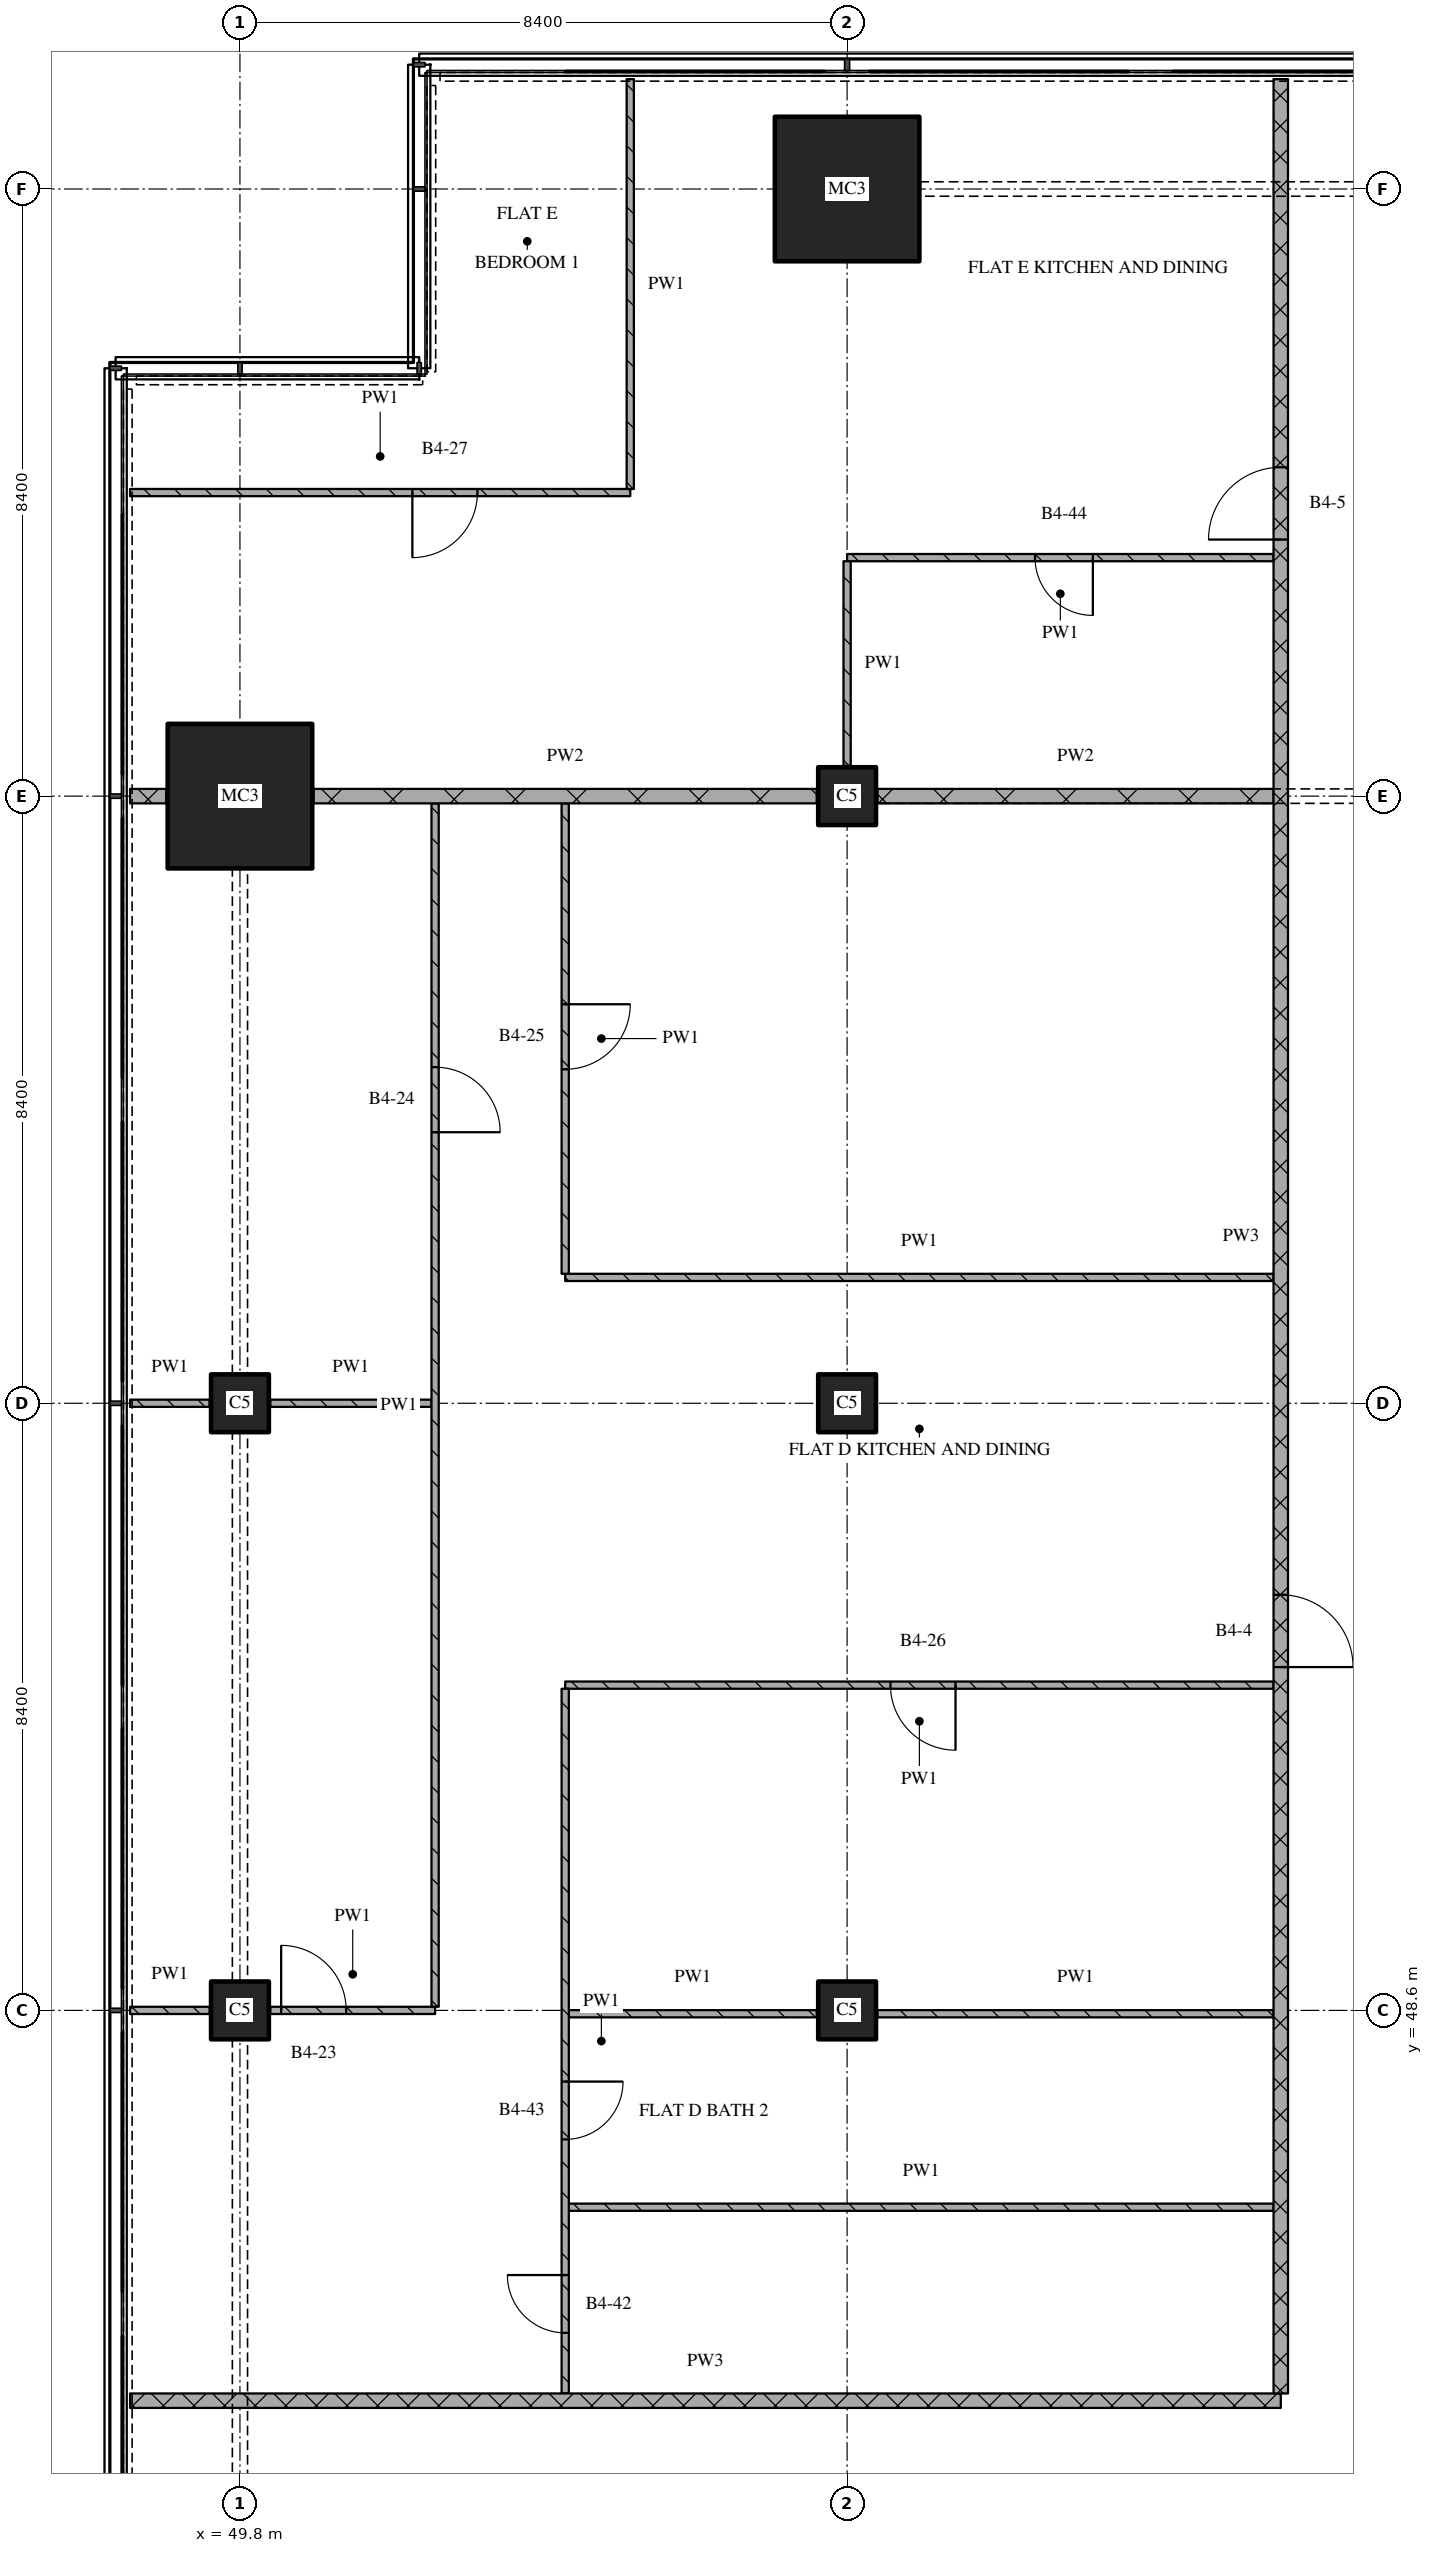
"""IFC4 building model, lengths in metres.
Left out: names, types, materials, properties, quantities, classifications, styles, units other than length and angle.
Written with IfcOpenShell. Run it as: python <this file> out.ifc"""

import sys

from ifc_helpers import new_model, si_unit, direction, frame, frame_2d, origin, origin_2d, place, context, subcontext, project, spatial, rectangle, extrude, element, fill, save


model = new_model("IFC4")
c1 = context("Model", 3, precision=1e-05, world=origin(), true_north=direction((0.0, 1.0)))
c2 = subcontext(c1, "Body", "Model", "MODEL_VIEW")
j1 = project(units=[si_unit("LENGTHUNIT", "METRE"), si_unit("PLANEANGLEUNIT", "RADIAN")], contexts=[c1])
p1 = place(None, origin())
s1 = spatial("IfcSite", under=j1, at=p1, CompositionType="ELEMENT")
p2 = place(p1, origin())
s2 = spatial("IfcBuilding", under=s1, at=p2, CompositionType="ELEMENT")
p3 = place(p2, frame((0.0, 0.0, 134.85)))
s3 = spatial("IfcBuildingStorey", under=s2, at=p3, CompositionType="ELEMENT", Elevation=134.85)
for number, where, z_axis, x_axis in (
    (1, (49.8, 48.6, 0.0), (0.0, 0.0, 1.0), (1.0, 0.0, 0.0)),
    (2, (49.8, 57.0, 0.0), (0.0, 0.0, 1.0), (1.0, 0.0, 0.0)),
):
    element("IfcColumn", number, at=place(p3, frame(where, z_axis=z_axis, x_axis=x_axis)), inside=s3, PredefinedType="COLUMN", context=c2, shape_type="SweptSolid", body=[
        extrude(rectangle(XDim=0.8, YDim=0.8, at=origin_2d()), origin(), (0.0, 0.0, 1.0), 3.6),
    ])
p4 = place(p3, frame((49.8, 65.4, 0.0), z_axis=(0.0, 0.0, 1.0), x_axis=(1.0, 0.0, 0.0)))
e3 = element("IfcColumn", 3, at=p4, inside=s3, PredefinedType="COLUMN", context=c2, shape_type="SweptSolid", body=[
    extrude(rectangle(XDim=2.0, YDim=2.0, at=origin_2d()), origin(), (0.0, 0.0, 1.0), 3.6),
])
for number, where, z_axis, x_axis in (
    (4, (58.2, 48.6, 0.0), (0.0, 0.0, 1.0), (1.0, 0.0, 0.0)),
    (5, (58.2, 57.0, 0.0), (0.0, 0.0, 1.0), (1.0, 0.0, 0.0)),
    (6, (58.2, 65.4, 0.0), (0.0, 0.0, 1.0), (1.0, 0.0, 0.0)),
):
    element("IfcColumn", number, at=place(p3, frame(where, z_axis=z_axis, x_axis=x_axis)), inside=s3, PredefinedType="COLUMN", context=c2, shape_type="SweptSolid", body=[
        extrude(rectangle(XDim=0.8, YDim=0.8, at=origin_2d()), origin(), (0.0, 0.0, 1.0), 3.6),
    ])
p5 = place(p3, frame((58.2, 73.8, 0.0), z_axis=(0.0, 0.0, 1.0), x_axis=(1.0, 0.0, 0.0)))
e7 = element("IfcColumn", 7, at=p5, inside=s3, PredefinedType="COLUMN", context=c2, shape_type="SweptSolid", body=[
    extrude(rectangle(XDim=2.0, YDim=2.0, at=origin_2d()), origin(), (0.0, 0.0, 1.0), 3.6),
])
p6 = place(p3, frame((48.28, 43.2, 0.0), z_axis=(0.0, 0.0, 1.0), x_axis=(1.0, 0.0, 0.0)))
e8 = element("IfcWall", 8, at=p6, inside=s3, PredefinedType="PARTITIONING", context=c2, shape_type="SweptSolid", body=[
    extrude(rectangle(XDim=15.92, YDim=0.2, at=frame_2d((7.96, 0.0))), origin(), (0.0, 0.0, 1.0), 3.32),
])
p7 = place(p3, frame((54.35, 45.877, 0.0), z_axis=(0.0, 0.0, 1.0), x_axis=(1.0, 0.0, 0.0)))
e9 = element("IfcWall", 9, at=p7, inside=s3, PredefinedType="PARTITIONING", context=c2, shape_type="SweptSolid", body=[
    extrude(rectangle(XDim=9.75, YDim=0.1, at=frame_2d((4.875, 0.0))), origin(), (0.0, 0.0, 1.0), 3.32),
])
p8 = place(p3, frame((54.35, 48.553, 0.0), z_axis=(0.0, 0.0, 1.0), x_axis=(1.0, 0.0, 0.0)))
e10 = element("IfcWall", 10, at=p8, inside=s3, PredefinedType="PARTITIONING", context=c2, shape_type="SweptSolid", body=[
    extrude(rectangle(XDim=3.43, YDim=0.1, at=frame_2d((1.715, 0.0))), origin(), (0.0, 0.0, 1.0), 3.32),
])
p9 = place(p3, frame((58.62, 48.553, 0.0), z_axis=(0.0, 0.0, 1.0), x_axis=(1.0, 0.0, 0.0)))
e11 = element("IfcWall", 11, at=p9, inside=s3, PredefinedType="PARTITIONING", context=c2, shape_type="SweptSolid", body=[
    extrude(rectangle(XDim=5.48, YDim=0.1, at=frame_2d((2.74, 0.0))), origin(), (0.0, 0.0, 1.0), 3.32),
])
p10 = place(p3, frame((48.28, 48.6, 0.0), z_axis=(0.0, 0.0, 1.0), x_axis=(1.0, 0.0, 0.0)))
e12 = element("IfcWall", 12, at=p10, inside=s3, PredefinedType="PARTITIONING", context=c2, shape_type="SweptSolid", body=[
    extrude(rectangle(XDim=1.1, YDim=0.1, at=frame_2d((0.55, 0.0))), origin(), (0.0, 0.0, 1.0), 3.32),
])
p11 = place(p3, frame((50.22, 48.6, 0.0), z_axis=(0.0, 0.0, 1.0), x_axis=(1.0, 0.0, 0.0)))
e13 = element("IfcWall", 13, at=p11, inside=s3, PredefinedType="PARTITIONING", context=c2, shape_type="SweptSolid", body=[
    extrude(rectangle(XDim=2.28, YDim=0.1, at=frame_2d((1.14, 0.0))), origin(), (0.0, 0.0, 1.0), 3.32),
])
p12 = place(p11, frame((0.15, 0.0, 0.0)))
e14 = element("IfcOpeningElement", 14, at=p12, cuts=e13, PredefinedType="OPENING", context=c2, shape_type="SweptSolid", body=[
    extrude(rectangle(XDim=0.9, YDim=2.1, at=frame_2d((0.45, 1.05))), frame((0.0, 0.06, 0.0), z_axis=(0.0, -1.0, 0.0), x_axis=(1.0, 0.0, 0.0)), (0.0, 0.0, 1.0), 0.12),
])
p13 = place(p3, frame((64.1, 53.1, 0.0), z_axis=(0.0, 0.0, 1.0), x_axis=(-1.0, 0.0, 0.0)))
e15 = element("IfcWall", 15, at=p13, inside=s3, PredefinedType="PARTITIONING", context=c2, shape_type="SweptSolid", body=[
    extrude(rectangle(XDim=9.8, YDim=0.1, at=frame_2d((4.9, 0.0))), origin(), (0.0, 0.0, 1.0), 3.32),
])
p14 = place(p13, frame((4.4, 0.0, 0.0)))
e16 = element("IfcOpeningElement", 16, at=p14, cuts=e15, PredefinedType="OPENING", context=c2, shape_type="SweptSolid", body=[
    extrude(rectangle(XDim=0.9, YDim=2.1, at=frame_2d((0.45, 1.05))), frame((0.0, 0.06, 0.0), z_axis=(0.0, -1.0, 0.0), x_axis=(1.0, 0.0, 0.0)), (0.0, 0.0, 1.0), 0.12),
])
p15 = place(p3, frame((48.28, 57.0, 0.0), z_axis=(0.0, 0.0, 1.0), x_axis=(1.0, 0.0, 0.0)))
e17 = element("IfcWall", 17, at=p15, inside=s3, PredefinedType="PARTITIONING", context=c2, shape_type="SweptSolid", body=[
    extrude(rectangle(XDim=1.1, YDim=0.1, at=frame_2d((0.55, 0.0))), origin(), (0.0, 0.0, 1.0), 3.32),
])
p16 = place(p3, frame((50.22, 57.0, 0.0), z_axis=(0.0, 0.0, 1.0), x_axis=(1.0, 0.0, 0.0)))
e18 = element("IfcWall", 18, at=p16, inside=s3, PredefinedType="PARTITIONING", context=c2, shape_type="SweptSolid", body=[
    extrude(rectangle(XDim=2.23, YDim=0.1, at=frame_2d((1.115, 0.0))), origin(), (0.0, 0.0, 1.0), 3.32),
])
p17 = place(p3, frame((54.3, 58.741, 0.0), z_axis=(0.0, 0.0, 1.0), x_axis=(1.0, 0.0, 0.0)))
e19 = element("IfcWall", 19, at=p17, inside=s3, PredefinedType="PARTITIONING", context=c2, shape_type="SweptSolid", body=[
    extrude(rectangle(XDim=9.8, YDim=0.1, at=frame_2d((4.9, 0.0))), origin(), (0.0, 0.0, 1.0), 3.32),
])
p18 = place(p3, frame((48.28, 65.4, 0.0), z_axis=(0.0, 0.0, 1.0), x_axis=(1.0, 0.0, 0.0)))
e20 = element("IfcWall", 20, at=p18, inside=s3, PredefinedType="PARTITIONING", context=c2, shape_type="SweptSolid", body=[
    extrude(rectangle(XDim=0.5, YDim=0.2, at=frame_2d((0.25, 0.0))), origin(), (0.0, 0.0, 1.0), 3.32),
])
p19 = place(p3, frame((50.82, 65.4, 0.0), z_axis=(0.0, 0.0, 1.0), x_axis=(1.0, 0.0, 0.0)))
e21 = element("IfcWall", 21, at=p19, inside=s3, PredefinedType="PARTITIONING", context=c2, shape_type="SweptSolid", body=[
    extrude(rectangle(XDim=6.96, YDim=0.2, at=frame_2d((3.48, 0.0))), origin(), (0.0, 0.0, 1.0), 3.32),
])
p20 = place(p3, frame((58.62, 65.4, 0.0), z_axis=(0.0, 0.0, 1.0), x_axis=(1.0, 0.0, 0.0)))
e22 = element("IfcWall", 22, at=p20, inside=s3, PredefinedType="PARTITIONING", context=c2, shape_type="SweptSolid", body=[
    extrude(rectangle(XDim=5.48, YDim=0.2, at=frame_2d((2.74, 0.0))), origin(), (0.0, 0.0, 1.0), 2.82),
])
p21 = place(p3, frame((64.1, 68.7, 0.0), z_axis=(0.0, 0.0, 1.0), x_axis=(-1.0, 0.0, 0.0)))
e23 = element("IfcWall", 23, at=p21, inside=s3, PredefinedType="PARTITIONING", context=c2, shape_type="SweptSolid", body=[
    extrude(rectangle(XDim=5.9, YDim=0.1, at=frame_2d((2.95, 0.0))), origin(), (0.0, 0.0, 1.0), 3.32),
])
p22 = place(p21, frame((2.5, 0.0, 0.0)))
e24 = element("IfcOpeningElement", 24, at=p22, cuts=e23, PredefinedType="OPENING", context=c2, shape_type="SweptSolid", body=[
    extrude(rectangle(XDim=0.8, YDim=2.1, at=frame_2d((0.4, 1.05))), frame((0.0, 0.06, 0.0), z_axis=(0.0, -1.0, 0.0), x_axis=(1.0, 0.0, 0.0)), (0.0, 0.0, 1.0), 0.12),
])
p23 = place(p3, frame((48.28, 69.6, 0.0), z_axis=(0.0, 0.0, 1.0), x_axis=(1.0, 0.0, 0.0)))
e25 = element("IfcWall", 25, at=p23, inside=s3, PredefinedType="PARTITIONING", context=c2, shape_type="SweptSolid", body=[
    extrude(rectangle(XDim=6.92, YDim=0.1, at=frame_2d((3.46, 0.0))), origin(), (0.0, 0.0, 1.0), 3.32),
])
p24 = place(p23, frame((3.905, 0.0, 0.0)))
e26 = element("IfcOpeningElement", 26, at=p24, cuts=e25, PredefinedType="OPENING", context=c2, shape_type="SweptSolid", body=[
    extrude(rectangle(XDim=0.9, YDim=2.1, at=frame_2d((0.45, 1.05))), frame((0.0, 0.06, 0.0), z_axis=(0.0, -1.0, 0.0), x_axis=(1.0, 0.0, 0.0)), (0.0, 0.0, 1.0), 0.12),
])
p25 = place(p3, frame((52.5, 48.65, 0.0), z_axis=(0.0, 0.0, 1.0), x_axis=(0.0, 1.0, 0.0)))
e27 = element("IfcWall", 27, at=p25, inside=s3, PredefinedType="PARTITIONING", context=c2, shape_type="SweptSolid", body=[
    extrude(rectangle(XDim=16.65, YDim=0.1, at=frame_2d((8.325, 0.0))), origin(), (0.0, 0.0, 1.0), 3.32),
])
p26 = place(p25, frame((12.1, 0.0, 0.0)))
e28 = element("IfcOpeningElement", 28, at=p26, cuts=e27, PredefinedType="OPENING", context=c2, shape_type="SweptSolid", body=[
    extrude(rectangle(XDim=0.9, YDim=2.1, at=frame_2d((0.45, 1.05))), frame((0.0, 0.06, 0.0), z_axis=(0.0, -1.0, 0.0), x_axis=(1.0, 0.0, 0.0)), (0.0, 0.0, 1.0), 0.12),
])
p27 = place(p3, frame((54.3, 53.05, 0.0), z_axis=(0.0, 0.0, 1.0), x_axis=(0.0, -1.0, 0.0)))
e29 = element("IfcWall", 29, at=p27, inside=s3, PredefinedType="PARTITIONING", context=c2, shape_type="SweptSolid", body=[
    extrude(rectangle(XDim=9.75, YDim=0.1, at=frame_2d((4.875, 0.0))), origin(), (0.0, 0.0, 1.0), 3.32),
])
p28 = place(p27, frame((5.435, 0.0, 0.0)))
e30 = element("IfcOpeningElement", 30, at=p28, cuts=e29, PredefinedType="OPENING", context=c2, shape_type="SweptSolid", body=[
    extrude(rectangle(XDim=0.8, YDim=2.1, at=frame_2d((0.4, 1.05))), frame((0.0, 0.06, 0.0), z_axis=(0.0, -1.0, 0.0), x_axis=(1.0, 0.0, 0.0)), (0.0, 0.0, 1.0), 0.12),
])
p29 = place(p27, frame((8.112, 0.0, 0.0)))
e31 = element("IfcOpeningElement", 31, at=p29, cuts=e29, PredefinedType="OPENING", context=c2, shape_type="SweptSolid", body=[
    extrude(rectangle(XDim=0.8, YDim=2.1, at=frame_2d((0.4, 1.05))), frame((0.0, 0.06, 0.0), z_axis=(0.0, -1.0, 0.0), x_axis=(1.0, 0.0, 0.0)), (0.0, 0.0, 1.0), 0.12),
])
p30 = place(p3, frame((54.3, 65.3, 0.0), z_axis=(0.0, 0.0, 1.0), x_axis=(0.0, -1.0, 0.0)))
e32 = element("IfcWall", 32, at=p30, inside=s3, PredefinedType="PARTITIONING", context=c2, shape_type="SweptSolid", body=[
    extrude(rectangle(XDim=6.509, YDim=0.1, at=frame_2d((3.254, 0.0))), origin(), (0.0, 0.0, 1.0), 3.32),
])
p31 = place(p30, frame((2.779, 0.0, 0.0)))
e33 = element("IfcOpeningElement", 33, at=p31, cuts=e32, PredefinedType="OPENING", context=c2, shape_type="SweptSolid", body=[
    extrude(rectangle(XDim=0.9, YDim=2.1, at=frame_2d((0.45, 1.05))), frame((0.0, 0.06, 0.0), z_axis=(0.0, -1.0, 0.0), x_axis=(1.0, 0.0, 0.0)), (0.0, 0.0, 1.0), 0.12),
])
p32 = place(p3, frame((55.2, 75.32, 0.0), z_axis=(0.0, 0.0, 1.0), x_axis=(0.0, -1.0, 0.0)))
e34 = element("IfcWall", 34, at=p32, inside=s3, PredefinedType="PARTITIONING", context=c2, shape_type="SweptSolid", body=[
    extrude(rectangle(XDim=5.67, YDim=0.1, at=frame_2d((2.835, 0.0))), origin(), (0.0, 0.0, 1.0), 3.32),
])
p33 = place(p3, frame((58.2, 68.65, 0.0), z_axis=(0.0, 0.0, 1.0), x_axis=(0.0, -1.0, 0.0)))
e35 = element("IfcWall", 35, at=p33, inside=s3, PredefinedType="PARTITIONING", context=c2, shape_type="SweptSolid", body=[
    extrude(rectangle(XDim=2.83, YDim=0.1, at=frame_2d((1.415, 0.0))), origin(), (0.0, 0.0, 1.0), 3.32),
])
p34 = place(p3, frame((64.2, 43.3, 0.0), z_axis=(0.0, 0.0, 1.0), x_axis=(0.0, 1.0, 0.0)))
e36 = element("IfcWall", 36, at=p34, inside=s3, PredefinedType="PARTITIONING", context=c2, shape_type="SweptSolid", body=[
    extrude(rectangle(XDim=32.02, YDim=0.2, at=frame_2d((16.01, 0.0))), origin(), (0.0, 0.0, 1.0), 3.32),
])
p35 = place(p34, frame((10.05, 0.0, 0.0)))
e37 = element("IfcOpeningElement", 37, at=p35, cuts=e36, PredefinedType="OPENING", context=c2, shape_type="SweptSolid", body=[
    extrude(rectangle(XDim=1.0, YDim=2.1, at=frame_2d((0.5, 1.05))), frame((0.0, 0.11, 0.0), z_axis=(0.0, -1.0, 0.0), x_axis=(1.0, 0.0, 0.0)), (0.0, 0.0, 1.0), 0.22),
])
p36 = place(p34, frame((25.65, 0.0, 0.0)))
e38 = element("IfcOpeningElement", 38, at=p36, cuts=e36, PredefinedType="OPENING", context=c2, shape_type="SweptSolid", body=[
    extrude(rectangle(XDim=1.0, YDim=2.1, at=frame_2d((0.5, 1.05))), frame((0.0, 0.11, 0.0), z_axis=(0.0, -1.0, 0.0), x_axis=(1.0, 0.0, 0.0)), (0.0, 0.0, 1.0), 0.22),
])
p37 = place(p12, origin())
e39 = element("IfcDoor", 39, at=p37, inside=s3, OperationType="SINGLE_SWING_LEFT", PredefinedType="DOOR", context=c2, shape_type="SweptSolid", body=[
    extrude(rectangle(XDim=0.9, YDim=2.1, at=frame_2d((0.45, 1.05))), frame((0.0, 0.025, 0.0), z_axis=(0.0, -1.0, 0.0), x_axis=(1.0, 0.0, 0.0)), (0.0, 0.0, 1.0), 0.05),
])
fill(e14, e39)
p38 = place(p14, origin())
e40 = element("IfcDoor", 40, at=p38, inside=s3, OperationType="SINGLE_SWING_LEFT", PredefinedType="DOOR", context=c2, shape_type="SweptSolid", body=[
    extrude(rectangle(XDim=0.9, YDim=2.1, at=frame_2d((0.45, 1.05))), frame((0.0, 0.025, 0.0), z_axis=(0.0, -1.0, 0.0), x_axis=(1.0, 0.0, 0.0)), (0.0, 0.0, 1.0), 0.05),
])
fill(e16, e40)
p39 = place(p22, origin())
e41 = element("IfcDoor", 41, at=p39, inside=s3, OperationType="SINGLE_SWING_LEFT", PredefinedType="DOOR", context=c2, shape_type="SweptSolid", body=[
    extrude(rectangle(XDim=0.8, YDim=2.1, at=frame_2d((0.4, 1.05))), frame((0.0, 0.025, 0.0), z_axis=(0.0, -1.0, 0.0), x_axis=(1.0, 0.0, 0.0)), (0.0, 0.0, 1.0), 0.05),
])
fill(e24, e41)
p40 = place(p24, origin())
e42 = element("IfcDoor", 42, at=p40, inside=s3, OperationType="SINGLE_SWING_RIGHT", PredefinedType="DOOR", context=c2, shape_type="SweptSolid", body=[
    extrude(rectangle(XDim=0.9, YDim=2.1, at=frame_2d((0.45, 1.05))), frame((0.0, 0.025, 0.0), z_axis=(0.0, -1.0, 0.0), x_axis=(1.0, 0.0, 0.0)), (0.0, 0.0, 1.0), 0.05),
])
fill(e26, e42)
p41 = place(p26, origin())
e43 = element("IfcDoor", 43, at=p41, inside=s3, OperationType="SINGLE_SWING_RIGHT", PredefinedType="DOOR", context=c2, shape_type="SweptSolid", body=[
    extrude(rectangle(XDim=0.9, YDim=2.1, at=frame_2d((0.45, 1.05))), frame((0.0, 0.025, 0.0), z_axis=(0.0, -1.0, 0.0), x_axis=(1.0, 0.0, 0.0)), (0.0, 0.0, 1.0), 0.05),
])
fill(e28, e43)
p42 = place(p28, origin())
e44 = element("IfcDoor", 44, at=p42, inside=s3, OperationType="SINGLE_SWING_LEFT", PredefinedType="DOOR", context=c2, shape_type="SweptSolid", body=[
    extrude(rectangle(XDim=0.8, YDim=2.1, at=frame_2d((0.4, 1.05))), frame((0.0, 0.025, 0.0), z_axis=(0.0, -1.0, 0.0), x_axis=(1.0, 0.0, 0.0)), (0.0, 0.0, 1.0), 0.05),
])
fill(e30, e44)
p43 = place(p29, origin())
e45 = element("IfcDoor", 45, at=p43, inside=s3, OperationType="SINGLE_SWING_RIGHT", PredefinedType="DOOR", context=c2, shape_type="SweptSolid", body=[
    extrude(rectangle(XDim=0.8, YDim=2.1, at=frame_2d((0.4, 1.05))), frame((0.0, 0.025, 0.0), z_axis=(0.0, -1.0, 0.0), x_axis=(1.0, 0.0, 0.0)), (0.0, 0.0, 1.0), 0.05),
])
fill(e31, e45)
p44 = place(p31, origin())
e46 = element("IfcDoor", 46, at=p44, inside=s3, OperationType="SINGLE_SWING_LEFT", PredefinedType="DOOR", context=c2, shape_type="SweptSolid", body=[
    extrude(rectangle(XDim=0.9, YDim=2.1, at=frame_2d((0.45, 1.05))), frame((0.0, 0.025, 0.0), z_axis=(0.0, -1.0, 0.0), x_axis=(1.0, 0.0, 0.0)), (0.0, 0.0, 1.0), 0.05),
])
fill(e33, e46)
p45 = place(p35, origin())
e47 = element("IfcDoor", 47, at=p45, inside=s3, OperationType="SINGLE_SWING_RIGHT", PredefinedType="DOOR", context=c2, shape_type="SweptSolid", body=[
    extrude(rectangle(XDim=1.0, YDim=2.1, at=frame_2d((0.5, 1.05))), frame((0.0, 0.025, 0.0), z_axis=(0.0, -1.0, 0.0), x_axis=(1.0, 0.0, 0.0)), (0.0, 0.0, 1.0), 0.05),
])
fill(e37, e47)
p46 = place(p36, origin())
e48 = element("IfcDoor", 48, at=p46, inside=s3, OperationType="SINGLE_SWING_LEFT", PredefinedType="DOOR", context=c2, shape_type="SweptSolid", body=[
    extrude(rectangle(XDim=1.0, YDim=2.1, at=frame_2d((0.5, 1.05))), frame((0.0, 0.025, 0.0), z_axis=(0.0, -1.0, 0.0), x_axis=(1.0, 0.0, 0.0)), (0.0, 0.0, 1.0), 0.05),
])
fill(e38, e48)
save(model, sys.argv[1])
